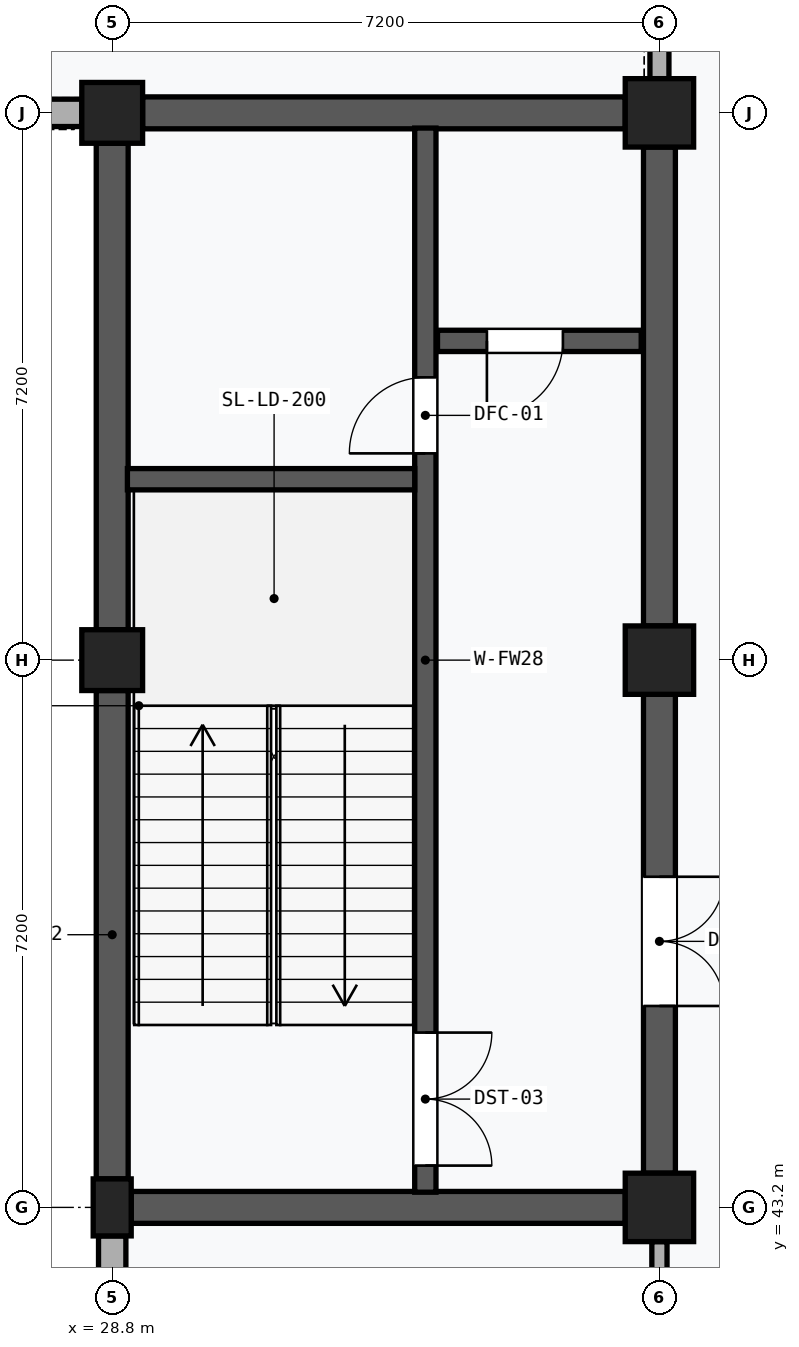
"""IFC4 building model, lengths in metres.
Left out: names, types, materials, properties, quantities, classifications, styles, units other than length and angle.
Written with IfcOpenShell. Run it as: python <this file> out.ifc"""

import sys

from ifc_helpers import new_model, si_unit, direction, frame, frame_2d, origin, origin_2d, place, context, subcontext, project, spatial, rectangle, extrude, element, fill, save


model = new_model("IFC4")
c1 = context("Model", 3, precision=1e-05, world=origin(), true_north=direction((0.0, 1.0)))
c2 = subcontext(c1, "Body", "Model", "MODEL_VIEW")
j1 = project(units=[si_unit("LENGTHUNIT", "METRE"), si_unit("PLANEANGLEUNIT", "RADIAN")], contexts=[c1])
p1 = place(None, origin())
s1 = spatial("IfcSite", under=j1, at=p1, CompositionType="ELEMENT")
p2 = place(p1, origin())
s2 = spatial("IfcBuilding", under=s1, at=p2, CompositionType="ELEMENT")
p3 = place(p2, origin())
s3 = spatial("IfcBuildingStorey", under=s2, at=p3, CompositionType="ELEMENT", Elevation=0.0)
p4 = place(p3, frame((28.8, 43.2, 0.0), z_axis=(0.0, 0.0, 1.0), x_axis=(1.0, 0.0, 0.0)))
e1 = element("IfcColumn", 1, at=p4, inside=s3, PredefinedType="PILASTER", context=c2, shape_type="SweptSolid", body=[
    extrude(rectangle(XDim=0.5, YDim=0.75, at=origin_2d()), origin(), (0.0, 0.0, 1.0), 4.8),
])
for number, where, z_axis, x_axis in (
    (2, (28.8, 50.4, 0.0), (0.0, 0.0, 1.0), (1.0, 0.0, 0.0)),
    (3, (28.8, 57.6, 0.0), (0.0, 0.0, 1.0), (1.0, 0.0, 0.0)),
):
    element("IfcColumn", number, at=place(p3, frame(where, z_axis=z_axis, x_axis=x_axis)), inside=s3, PredefinedType="COLUMN", context=c2, shape_type="SweptSolid", body=[
        extrude(rectangle(XDim=0.8, YDim=0.8, at=origin_2d()), origin(), (0.0, 0.0, 1.0), 4.8),
    ])
for number, where, z_axis, x_axis in (
    (4, (36.0, 43.2, 0.0), (0.0, 0.0, 1.0), (1.0, 0.0, 0.0)),
    (5, (36.0, 50.4, 0.0), (0.0, 0.0, 1.0), (1.0, 0.0, 0.0)),
    (6, (36.0, 57.6, 0.0), (0.0, 0.0, 1.0), (1.0, 0.0, 0.0)),
):
    element("IfcColumn", number, at=place(p3, frame(where, z_axis=z_axis, x_axis=x_axis)), inside=s3, PredefinedType="COLUMN", context=c2, shape_type="SweptSolid", body=[
        extrude(rectangle(XDim=0.9, YDim=0.9, at=origin_2d()), origin(), (0.0, 0.0, 1.0), 4.8),
    ])
p5 = place(p3, frame((22.0, 57.6, 0.0), z_axis=(0.0, 0.0, 1.0), x_axis=(1.0, 0.0, 0.0)))
e7 = element("IfcWall", 7, at=p5, inside=s3, PredefinedType="SOLIDWALL", context=c2, shape_type="SweptSolid", body=[
    extrude(rectangle(XDim=6.4, YDim=0.36, at=frame_2d((3.2, 0.0))), origin(), (0.0, 0.0, 1.0), 4.47),
])
p6 = place(p5, frame((1.55, 0.0, 0.85)))
e8 = element("IfcOpeningElement", 8, at=p6, cuts=e7, PredefinedType="OPENING", context=c2, shape_type="SweptSolid", body=[
    extrude(rectangle(XDim=3.3, YDim=2.0, at=frame_2d((1.65, 1.0))), frame((0.0, 0.192, 0.0), z_axis=(0.0, -1.0, 0.0), x_axis=(1.0, 0.0, 0.0)), (0.0, 0.0, 1.0), 0.384),
])
p7 = place(p3, frame((28.8, 36.4, 0.0), z_axis=(0.0, 0.0, 1.0), x_axis=(0.0, 1.0, 0.0)))
e9 = element("IfcWall", 9, at=p7, inside=s3, PredefinedType="SOLIDWALL", context=c2, shape_type="SweptSolid", body=[
    extrude(rectangle(XDim=6.425, YDim=0.36, at=frame_2d((3.212, 0.0))), origin(), (0.0, 0.0, 1.0), 3.89),
])
p8 = place(p7, frame((1.863, 0.0, 0.85)))
e10 = element("IfcOpeningElement", 10, at=p8, cuts=e9, PredefinedType="OPENING", context=c2, shape_type="SweptSolid", body=[
    extrude(rectangle(XDim=2.7, YDim=2.0, at=frame_2d((1.35, 1.0))), frame((0.0, 0.192, 0.0), z_axis=(0.0, -1.0, 0.0), x_axis=(1.0, 0.0, 0.0)), (0.0, 0.0, 1.0), 0.384),
])
p9 = place(p3, frame((28.8, 43.575, 0.0), z_axis=(0.0, 0.0, 1.0), x_axis=(0.0, 1.0, 0.0)))
e11 = element("IfcWall", 11, at=p9, inside=s3, PredefinedType="SHEAR", context=c2, shape_type="SweptSolid", body=[
    extrude(rectangle(XDim=6.425, YDim=0.42, at=frame_2d((3.212, 0.0))), origin(), (0.0, 0.0, 1.0), 3.89),
])
p10 = place(p3, frame((28.8, 50.8, 0.0), z_axis=(0.0, 0.0, 1.0), x_axis=(0.0, 1.0, 0.0)))
e12 = element("IfcWall", 12, at=p10, inside=s3, PredefinedType="SHEAR", context=c2, shape_type="SweptSolid", body=[
    extrude(rectangle(XDim=6.4, YDim=0.42, at=frame_2d((3.2, 0.0))), origin(), (0.0, 0.0, 1.0), 3.89),
])
p11 = place(p3, frame((36.0, 43.65, 0.0), z_axis=(0.0, 0.0, 1.0), x_axis=(0.0, 1.0, 0.0)))
e13 = element("IfcWall", 13, at=p11, inside=s3, PredefinedType="SHEAR", context=c2, shape_type="SweptSolid", body=[
    extrude(rectangle(XDim=6.3, YDim=0.42, at=frame_2d((3.15, 0.0))), origin(), (0.0, 0.0, 1.0), 3.62),
])
p12 = place(p11, frame((2.2, 0.0, 0.0)))
e14 = element("IfcOpeningElement", 14, at=p12, cuts=e13, PredefinedType="OPENING", context=c2, shape_type="SweptSolid", body=[
    extrude(rectangle(XDim=1.7, YDim=2.25, at=frame_2d((0.85, 1.125))), frame((0.0, 0.222, 0.0), z_axis=(0.0, -1.0, 0.0), x_axis=(1.0, 0.0, 0.0)), (0.0, 0.0, 1.0), 0.444),
])
p13 = place(p3, frame((36.0, 50.85, 0.0), z_axis=(0.0, 0.0, 1.0), x_axis=(0.0, 1.0, 0.0)))
e15 = element("IfcWall", 15, at=p13, inside=s3, PredefinedType="SHEAR", context=c2, shape_type="SweptSolid", body=[
    extrude(rectangle(XDim=6.3, YDim=0.42, at=frame_2d((3.15, 0.0))), origin(), (0.0, 0.0, 1.0), 3.62),
])
p14 = place(p3, frame((29.05, 43.2, 0.0), z_axis=(0.0, 0.0, 1.0), x_axis=(1.0, 0.0, 0.0)))
e16 = element("IfcWall", 16, at=p14, inside=s3, PredefinedType="SHEAR", context=c2, shape_type="SweptSolid", body=[
    extrude(rectangle(XDim=6.5, YDim=0.42, at=frame_2d((3.25, 0.0))), origin(), (0.0, 0.0, 1.0), 3.62),
])
p15 = place(p3, frame((29.2, 57.6, 0.0), z_axis=(0.0, 0.0, 1.0), x_axis=(1.0, 0.0, 0.0)))
e17 = element("IfcWall", 17, at=p15, inside=s3, PredefinedType="SHEAR", context=c2, shape_type="SweptSolid", body=[
    extrude(rectangle(XDim=6.35, YDim=0.42, at=frame_2d((3.175, 0.0))), origin(), (0.0, 0.0, 1.0), 3.62),
])
p16 = place(p3, frame((32.92, 43.4, 0.0), z_axis=(0.0, 0.0, 1.0), x_axis=(0.0, 1.0, 0.0)))
e18 = element("IfcWall", 18, at=p16, inside=s3, PredefinedType="SHEAR", context=c2, shape_type="SweptSolid", body=[
    extrude(rectangle(XDim=14.0, YDim=0.28, at=frame_2d((7.0, 0.0))), origin(), (0.0, 0.0, 1.0), 4.52),
])
p17 = place(p16, frame((0.35, 0.0, 0.0)))
e19 = element("IfcOpeningElement", 19, at=p17, cuts=e18, PredefinedType="OPENING", context=c2, shape_type="SweptSolid", body=[
    extrude(rectangle(XDim=1.75, YDim=2.15, at=frame_2d((0.875, 1.075))), frame((0.0, 0.152, 0.0), z_axis=(0.0, -1.0, 0.0), x_axis=(1.0, 0.0, 0.0)), (0.0, 0.0, 1.0), 0.304),
])
p18 = place(p16, frame((9.72, 0.0, 0.0)))
e20 = element("IfcOpeningElement", 20, at=p18, cuts=e18, PredefinedType="OPENING", context=c2, shape_type="SweptSolid", body=[
    extrude(rectangle(XDim=1.0, YDim=2.15, at=frame_2d((0.5, 1.075))), frame((0.0, 0.152, 0.0), z_axis=(0.0, -1.0, 0.0), x_axis=(1.0, 0.0, 0.0)), (0.0, 0.0, 1.0), 0.304),
])
p19 = place(p3, frame((29.0, 52.78, 0.0), z_axis=(0.0, 0.0, 1.0), x_axis=(1.0, 0.0, 0.0)))
e21 = element("IfcWall", 21, at=p19, inside=s3, PredefinedType="SHEAR", context=c2, shape_type="SweptSolid", body=[
    extrude(rectangle(XDim=3.78, YDim=0.28, at=frame_2d((1.89, 0.0))), origin(), (0.0, 0.0, 1.0), 4.52),
])
p20 = place(p3, frame((33.08, 54.6, 0.0), z_axis=(0.0, 0.0, 1.0), x_axis=(1.0, 0.0, 0.0)))
e22 = element("IfcWall", 22, at=p20, inside=s3, PredefinedType="SHEAR", context=c2, shape_type="SweptSolid", body=[
    extrude(rectangle(XDim=2.68, YDim=0.28, at=frame_2d((1.34, 0.0))), origin(), (0.0, 0.0, 1.0), 4.52),
])
p21 = place(p20, frame((0.65, 0.0, 0.0)))
e23 = element("IfcOpeningElement", 23, at=p21, cuts=e22, PredefinedType="OPENING", context=c2, shape_type="SweptSolid", body=[
    extrude(rectangle(XDim=1.0, YDim=2.15, at=frame_2d((0.5, 1.075))), frame((0.0, 0.152, 0.0), z_axis=(0.0, -1.0, 0.0), x_axis=(1.0, 0.0, 0.0)), (0.0, 0.0, 1.0), 0.304),
])
p22 = place(p3, frame((36.0, 58.05, 0.0), z_axis=(0.0, 0.0, 1.0), x_axis=(0.0, 1.0, 0.0)))
e24 = element("IfcWall", 24, at=p22, inside=s3, PredefinedType="PARTITIONING", context=c2, shape_type="SweptSolid", body=[
    extrude(rectangle(XDim=6.3, YDim=0.25, at=frame_2d((3.15, 0.0))), origin(), (0.0, 0.0, 1.0), 3.62),
])
p23 = place(p3, frame((36.0, 36.45, 0.0), z_axis=(0.0, 0.0, 1.0), x_axis=(0.0, 1.0, 0.0)))
e25 = element("IfcWall", 25, at=p23, inside=s3, PredefinedType="PARTITIONING", context=c2, shape_type="SweptSolid", body=[
    extrude(rectangle(XDim=6.3, YDim=0.2, at=frame_2d((3.15, 0.0))), origin(), (0.0, 0.0, 1.0), 3.62),
])
p24 = place(p12, frame((1.7, 0.0, 0.0), z_axis=(0.0, 0.0, 1.0), x_axis=(-1.0, 0.0, 0.0)))
e26 = element("IfcDoor", 26, at=p24, inside=s3, OperationType="DOUBLE_DOOR_SINGLE_SWING", PredefinedType="DOOR", context=c2, shape_type="SweptSolid", body=[
    extrude(rectangle(XDim=1.7, YDim=2.25, at=frame_2d((0.85, 1.125))), frame((0.0, 0.025, 0.0), z_axis=(0.0, -1.0, 0.0), x_axis=(1.0, 0.0, 0.0)), (0.0, 0.0, 1.0), 0.05),
])
fill(e14, e26)
p25 = place(p17, frame((1.75, 0.0, 0.0), z_axis=(0.0, 0.0, 1.0), x_axis=(-1.0, 0.0, 0.0)))
e27 = element("IfcDoor", 27, at=p25, inside=s3, OperationType="DOUBLE_DOOR_SINGLE_SWING", PredefinedType="DOOR", context=c2, shape_type="SweptSolid", body=[
    extrude(rectangle(XDim=1.75, YDim=2.15, at=frame_2d((0.875, 1.075))), frame((0.0, 0.025, 0.0), z_axis=(0.0, -1.0, 0.0), x_axis=(1.0, 0.0, 0.0)), (0.0, 0.0, 1.0), 0.05),
])
fill(e19, e27)
p26 = place(p18, origin())
e28 = element("IfcDoor", 28, at=p26, inside=s3, OperationType="SINGLE_SWING_LEFT", PredefinedType="DOOR", context=c2, shape_type="SweptSolid", body=[
    extrude(rectangle(XDim=1.0, YDim=2.15, at=frame_2d((0.5, 1.075))), frame((0.0, 0.025, 0.0), z_axis=(0.0, -1.0, 0.0), x_axis=(1.0, 0.0, 0.0)), (0.0, 0.0, 1.0), 0.05),
])
fill(e20, e28)
p27 = place(p21, frame((1.0, 0.0, 0.0), z_axis=(0.0, 0.0, 1.0), x_axis=(-1.0, 0.0, 0.0)))
e29 = element("IfcDoor", 29, at=p27, inside=s3, OperationType="SINGLE_SWING_RIGHT", PredefinedType="DOOR", context=c2, shape_type="SweptSolid", body=[
    extrude(rectangle(XDim=1.0, YDim=2.15, at=frame_2d((0.5, 1.075))), frame((0.0, 0.025, 0.0), z_axis=(0.0, -1.0, 0.0), x_axis=(1.0, 0.0, 0.0)), (0.0, 0.0, 1.0), 0.05),
])
fill(e23, e29)
save(model, sys.argv[1])
